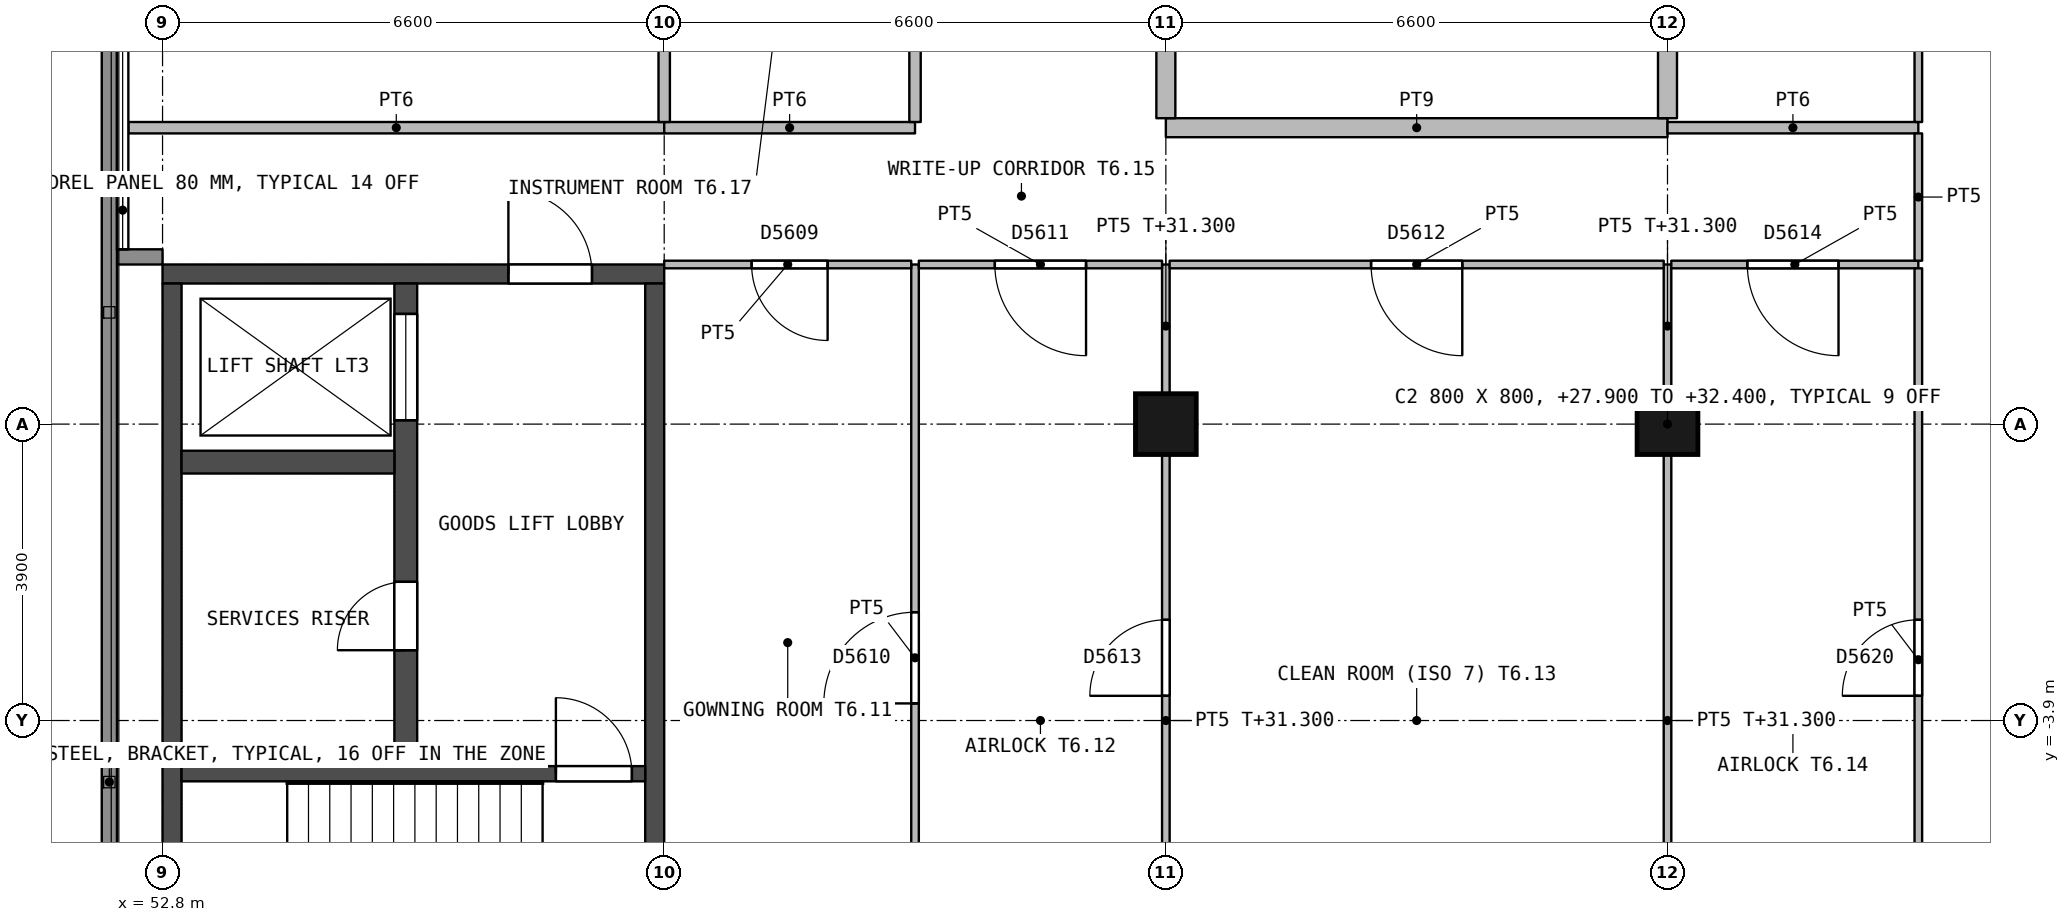
"""IFC4 building model, lengths in metres.
Left out: names, types, materials, properties, quantities, classifications, styles, units other than length and angle.
Written with IfcOpenShell. Run it as: python <this file> out.ifc"""

import sys

from ifc_helpers import new_model, si_unit, direction, frame, frame_2d, origin, origin_2d, place, context, subcontext, project, spatial, rectangle, extrude, element, fill, save


model = new_model("IFC4")
c1 = context("Model", 3, precision=1e-05, world=origin(), true_north=direction((0.0, 1.0)))
c2 = subcontext(c1, "Body", "Model", "MODEL_VIEW")
j1 = project(units=[si_unit("LENGTHUNIT", "METRE"), si_unit("PLANEANGLEUNIT", "RADIAN")], contexts=[c1])
p1 = place(None, origin())
s1 = spatial("IfcSite", under=j1, at=p1, CompositionType="ELEMENT")
p2 = place(p1, origin())
s2 = spatial("IfcBuilding", under=s1, at=p2, CompositionType="ELEMENT")
p3 = place(p2, frame((0.0, 0.0, 27.9)))
s3 = spatial("IfcBuildingStorey", under=s2, at=p3, CompositionType="ELEMENT", Elevation=27.9)
for number, where, z_axis, x_axis in (
    (1, (66.0, 0.0, 0.0), (0.0, 0.0, 1.0), (1.0, 0.0, 0.0)),
    (2, (72.6, 0.0, 0.0), (0.0, 0.0, 1.0), (1.0, 0.0, 0.0)),
):
    element("IfcColumn", number, at=place(p3, frame(where, z_axis=z_axis, x_axis=x_axis)), inside=s3, PredefinedType="COLUMN", context=c2, shape_type="SweptSolid", body=[
        extrude(rectangle(XDim=0.8, YDim=0.8, at=origin_2d()), origin(), (0.0, 0.0, 1.0), 4.5),
    ])
p4 = place(p3, frame((59.4, 1.975, 0.0), z_axis=(0.0, 0.0, 1.0), x_axis=(-1.0, 0.0, 0.0)))
e3 = element("IfcWall", 3, at=p4, inside=s3, PredefinedType="SHEAR", context=c2, shape_type="SweptSolid", body=[
    extrude(rectangle(XDim=6.6, YDim=0.25, at=frame_2d((3.3, 0.0))), origin(), (0.0, 0.0, 1.0), 4.2),
])
p5 = place(p4, frame((0.95, 0.0, 0.0)))
e4 = element("IfcOpeningElement", 4, at=p5, cuts=e3, PredefinedType="OPENING", context=c2, shape_type="SweptSolid", body=[
    extrude(rectangle(XDim=1.1, YDim=2.1, at=frame_2d((0.55, 1.05))), frame((0.0, 0.135, 0.0), z_axis=(0.0, -1.0, 0.0), x_axis=(1.0, 0.0, 0.0)), (0.0, 0.0, 1.0), 0.27),
])
for number, where, z_axis, x_axis in (
    (5, (59.275, 1.85, 0.0), (0.0, 0.0, 1.0), (0.0, -1.0, 0.0)),
    (6, (52.925, 1.85, 0.0), (0.0, 0.0, 1.0), (0.0, -1.0, 0.0)),
):
    element("IfcWall", number, at=place(p3, frame(where, z_axis=z_axis, x_axis=x_axis)), inside=s3, PredefinedType="SHEAR", context=c2, shape_type="SweptSolid", body=[
        extrude(rectangle(XDim=9.4, YDim=0.25, at=frame_2d((4.7, 0.0))), origin(), (0.0, 0.0, 1.0), 4.2),
    ])
p6 = place(p3, frame((59.15, -4.6, 0.0), z_axis=(0.0, 0.0, 1.0), x_axis=(-1.0, 0.0, 0.0)))
e7 = element("IfcWall", 7, at=p6, inside=s3, PredefinedType="SHEAR", context=c2, shape_type="SweptSolid", body=[
    extrude(rectangle(XDim=6.1, YDim=0.2, at=frame_2d((3.05, 0.0))), origin(), (0.0, 0.0, 1.0), 4.2),
])
p7 = place(p6, frame((0.175, 0.0, 0.0)))
e8 = element("IfcOpeningElement", 8, at=p7, cuts=e7, PredefinedType="OPENING", context=c2, shape_type="SweptSolid", body=[
    extrude(rectangle(XDim=1.0, YDim=2.1, at=frame_2d((0.5, 1.05))), frame((0.0, 0.11, 0.0), z_axis=(0.0, -1.0, 0.0), x_axis=(1.0, 0.0, 0.0)), (0.0, 0.0, 1.0), 0.22),
])
p8 = place(p3, frame((56.0, 1.85, 0.0), z_axis=(0.0, 0.0, 1.0), x_axis=(0.0, -1.0, 0.0)))
e9 = element("IfcWall", 9, at=p8, inside=s3, PredefinedType="SHEAR", context=c2, shape_type="SweptSolid", body=[
    extrude(rectangle(XDim=6.35, YDim=0.3, at=frame_2d((3.175, 0.0))), origin(), (0.0, 0.0, 1.0), 4.2),
])
p9 = place(p8, frame((3.925, 0.0, 0.0)))
e10 = element("IfcOpeningElement", 10, at=p9, cuts=e9, PredefinedType="OPENING", context=c2, shape_type="SweptSolid", body=[
    extrude(rectangle(XDim=0.9, YDim=2.1, at=frame_2d((0.45, 1.05))), frame((0.0, 0.16, 0.0), z_axis=(0.0, -1.0, 0.0), x_axis=(1.0, 0.0, 0.0)), (0.0, 0.0, 1.0), 0.32),
])
p10 = place(p8, frame((0.4, 0.0, 0.0)))
e11 = element("IfcOpeningElement", 11, at=p10, cuts=e9, PredefinedType="OPENING", context=c2, shape_type="SweptSolid", body=[
    extrude(rectangle(XDim=1.4, YDim=2.4, at=frame_2d((0.7, 1.2))), frame((0.0, 0.16, 0.0), z_axis=(0.0, -1.0, 0.0), x_axis=(1.0, 0.0, 0.0)), (0.0, 0.0, 1.0), 0.32),
])
p11 = place(p3, frame((55.85, -0.5, 0.0), z_axis=(0.0, 0.0, 1.0), x_axis=(-1.0, 0.0, 0.0)))
e12 = element("IfcWall", 12, at=p11, inside=s3, PredefinedType="SHEAR", context=c2, shape_type="SweptSolid", body=[
    extrude(rectangle(XDim=2.8, YDim=0.3, at=frame_2d((1.4, 0.0))), origin(), (0.0, 0.0, 1.0), 4.2),
])
p12 = place(p3, frame((52.8, 2.2, 0.0), z_axis=(0.0, 0.0, 1.0), x_axis=(-1.0, 0.0, 0.0)))
e13 = element("IfcWall", 13, at=p12, inside=s3, PredefinedType="STANDARD", context=c2, shape_type="SweptSolid", body=[
    extrude(rectangle(XDim=0.6, YDim=0.2, at=frame_2d((0.3, 0.0))), origin(), (0.0, 0.0, 1.0), 3.55),
])
p13 = place(p3, frame((52.1, -7.8, 0.0), z_axis=(0.0, 0.0, 1.0), x_axis=(0.0, 1.0, 0.0)))
e14 = element("IfcWall", 14, at=p13, inside=s3, PredefinedType="PARAPET", context=c2, shape_type="SweptSolid", body=[
    extrude(rectangle(XDim=30.9, YDim=0.2, at=frame_2d((15.45, 0.0))), origin(), (0.0, 0.0, 1.0), 1.1),
])
p14 = place(p3, frame((62.7, 2.1, 0.0), z_axis=(0.0, 0.0, 1.0), x_axis=(0.0, -1.0, 0.0)))
e15 = element("IfcWall", 15, at=p14, inside=s3, PredefinedType="PARTITIONING", context=c2, shape_type="SweptSolid", body=[
    extrude(rectangle(XDim=10.35, YDim=0.1, at=frame_2d((5.175, 0.0))), origin(), (0.0, 0.0, 1.0), 4.2),
])
p15 = place(p14, frame((4.575, 0.0, 0.0)))
e16 = element("IfcOpeningElement", 16, at=p15, cuts=e15, PredefinedType="OPENING", context=c2, shape_type="SweptSolid", body=[
    extrude(rectangle(XDim=1.2, YDim=2.1, at=frame_2d((0.6, 1.05))), frame((0.0, 0.06, 0.0), z_axis=(0.0, -1.0, 0.0), x_axis=(1.0, 0.0, 0.0)), (0.0, 0.0, 1.0), 0.12),
])
p16 = place(p3, frame((62.65, 2.1, 0.0), z_axis=(0.0, 0.0, 1.0), x_axis=(-1.0, 0.0, 0.0)))
e17 = element("IfcWall", 17, at=p16, inside=s3, PredefinedType="PARTITIONING", context=c2, shape_type="SweptSolid", body=[
    extrude(rectangle(XDim=3.25, YDim=0.1, at=frame_2d((1.625, 0.0))), origin(), (0.0, 0.0, 1.0), 4.2),
])
p17 = place(p16, frame((1.1, 0.0, 0.0)))
e18 = element("IfcOpeningElement", 18, at=p17, cuts=e17, PredefinedType="OPENING", context=c2, shape_type="SweptSolid", body=[
    extrude(rectangle(XDim=1.0, YDim=2.1, at=frame_2d((0.5, 1.05))), frame((0.0, 0.06, 0.0), z_axis=(0.0, -1.0, 0.0), x_axis=(1.0, 0.0, 0.0)), (0.0, 0.0, 1.0), 0.12),
])
p18 = place(p3, frame((66.0, -0.4, 0.0), z_axis=(0.0, 0.0, 1.0), x_axis=(0.0, -1.0, 0.0)))
e19 = element("IfcWall", 19, at=p18, inside=s3, PredefinedType="PARTITIONING", context=c2, shape_type="SweptSolid", body=[
    extrude(rectangle(XDim=7.0, YDim=0.1, at=frame_2d((3.5, 0.0))), origin(), (0.0, 0.0, 1.0), 3.4),
])
p19 = place(p18, frame((2.175, 0.0, 0.0)))
e20 = element("IfcOpeningElement", 20, at=p19, cuts=e19, PredefinedType="OPENING", context=c2, shape_type="SweptSolid", body=[
    extrude(rectangle(XDim=1.0, YDim=2.1, at=frame_2d((0.5, 1.05))), frame((0.0, 0.06, 0.0), z_axis=(0.0, -1.0, 0.0), x_axis=(1.0, 0.0, 0.0)), (0.0, 0.0, 1.0), 0.12),
])
p20 = place(p3, frame((66.0, 0.4, 0.0), z_axis=(0.0, 0.0, 1.0), x_axis=(0.0, 1.0, 0.0)))
e21 = element("IfcWall", 21, at=p20, inside=s3, PredefinedType="PARTITIONING", context=c2, shape_type="SweptSolid", body=[
    extrude(rectangle(XDim=1.7, YDim=0.1, at=frame_2d((0.85, 0.0))), origin(), (0.0, 0.0, 1.0), 3.4),
])
p21 = place(p3, frame((65.95, 2.1, 0.0), z_axis=(0.0, 0.0, 1.0), x_axis=(-1.0, 0.0, 0.0)))
e22 = element("IfcWall", 22, at=p21, inside=s3, PredefinedType="PARTITIONING", context=c2, shape_type="SweptSolid", body=[
    extrude(rectangle(XDim=3.2, YDim=0.1, at=frame_2d((1.6, 0.0))), origin(), (0.0, 0.0, 1.0), 4.2),
])
p22 = place(p21, frame((1.0, 0.0, 0.0)))
e23 = element("IfcOpeningElement", 23, at=p22, cuts=e22, PredefinedType="OPENING", context=c2, shape_type="SweptSolid", body=[
    extrude(rectangle(XDim=1.2, YDim=2.1, at=frame_2d((0.6, 1.05))), frame((0.0, 0.06, 0.0), z_axis=(0.0, -1.0, 0.0), x_axis=(1.0, 0.0, 0.0)), (0.0, 0.0, 1.0), 0.12),
])
p23 = place(p3, frame((72.6, -7.4, 0.0), z_axis=(0.0, 0.0, 1.0), x_axis=(0.0, 1.0, 0.0)))
e24 = element("IfcWall", 24, at=p23, inside=s3, PredefinedType="PARTITIONING", context=c2, shape_type="SweptSolid", body=[
    extrude(rectangle(XDim=7.0, YDim=0.1, at=frame_2d((3.5, 0.0))), origin(), (0.0, 0.0, 1.0), 3.4),
])
p24 = place(p3, frame((72.6, 0.4, 0.0), z_axis=(0.0, 0.0, 1.0), x_axis=(0.0, 1.0, 0.0)))
e25 = element("IfcWall", 25, at=p24, inside=s3, PredefinedType="PARTITIONING", context=c2, shape_type="SweptSolid", body=[
    extrude(rectangle(XDim=1.7, YDim=0.1, at=frame_2d((0.85, 0.0))), origin(), (0.0, 0.0, 1.0), 3.4),
])
p25 = place(p3, frame((72.55, 2.1, 0.0), z_axis=(0.0, 0.0, 1.0), x_axis=(-1.0, 0.0, 0.0)))
e26 = element("IfcWall", 26, at=p25, inside=s3, PredefinedType="PARTITIONING", context=c2, shape_type="SweptSolid", body=[
    extrude(rectangle(XDim=6.5, YDim=0.1, at=frame_2d((3.25, 0.0))), origin(), (0.0, 0.0, 1.0), 4.2),
])
p26 = place(p25, frame((2.65, 0.0, 0.0)))
e27 = element("IfcOpeningElement", 27, at=p26, cuts=e26, PredefinedType="OPENING", context=c2, shape_type="SweptSolid", body=[
    extrude(rectangle(XDim=1.2, YDim=2.1, at=frame_2d((0.6, 1.05))), frame((0.0, 0.06, 0.0), z_axis=(0.0, -1.0, 0.0), x_axis=(1.0, 0.0, 0.0)), (0.0, 0.0, 1.0), 0.12),
])
p27 = place(p3, frame((75.9, 2.1, 0.0), z_axis=(0.0, 0.0, 1.0), x_axis=(-1.0, 0.0, 0.0)))
e28 = element("IfcWall", 28, at=p27, inside=s3, PredefinedType="PARTITIONING", context=c2, shape_type="SweptSolid", body=[
    extrude(rectangle(XDim=3.25, YDim=0.1, at=frame_2d((1.625, 0.0))), origin(), (0.0, 0.0, 1.0), 4.2),
])
p28 = place(p27, frame((1.05, 0.0, 0.0)))
e29 = element("IfcOpeningElement", 29, at=p28, cuts=e28, PredefinedType="OPENING", context=c2, shape_type="SweptSolid", body=[
    extrude(rectangle(XDim=1.2, YDim=2.1, at=frame_2d((0.6, 1.05))), frame((0.0, 0.06, 0.0), z_axis=(0.0, -1.0, 0.0), x_axis=(1.0, 0.0, 0.0)), (0.0, 0.0, 1.0), 0.12),
])
p29 = place(p3, frame((75.9, 2.05, 0.0), z_axis=(0.0, 0.0, 1.0), x_axis=(0.0, -1.0, 0.0)))
e30 = element("IfcWall", 30, at=p29, inside=s3, PredefinedType="PARTITIONING", context=c2, shape_type="SweptSolid", body=[
    extrude(rectangle(XDim=10.3, YDim=0.1, at=frame_2d((5.15, 0.0))), origin(), (0.0, 0.0, 1.0), 4.2),
])
p30 = place(p29, frame((4.625, 0.0, 0.0)))
e31 = element("IfcOpeningElement", 31, at=p30, cuts=e30, PredefinedType="OPENING", context=c2, shape_type="SweptSolid", body=[
    extrude(rectangle(XDim=1.0, YDim=2.1, at=frame_2d((0.5, 1.05))), frame((0.0, 0.06, 0.0), z_axis=(0.0, -1.0, 0.0), x_axis=(1.0, 0.0, 0.0)), (0.0, 0.0, 1.0), 0.12),
])
p31 = place(p3, frame((59.4, 3.9, 0.0), z_axis=(0.0, 0.0, 1.0), x_axis=(-1.0, 0.0, 0.0)))
e32 = element("IfcWall", 32, at=p31, inside=s3, PredefinedType="PARTITIONING", context=c2, shape_type="SweptSolid", body=[
    extrude(rectangle(XDim=7.05, YDim=0.15, at=frame_2d((3.525, 0.0))), origin(), (0.0, 0.0, 1.0), 4.2),
])
p32 = place(p3, frame((62.7, 3.9, 0.0), z_axis=(0.0, 0.0, 1.0), x_axis=(-1.0, 0.0, 0.0)))
e33 = element("IfcWall", 33, at=p32, inside=s3, PredefinedType="PARTITIONING", context=c2, shape_type="SweptSolid", body=[
    extrude(rectangle(XDim=3.3, YDim=0.15, at=frame_2d((1.65, 0.0))), origin(), (0.0, 0.0, 1.0), 4.2),
])
p33 = place(p3, frame((72.6, 3.9, 0.0), z_axis=(0.0, 0.0, 1.0), x_axis=(-1.0, 0.0, 0.0)))
e34 = element("IfcWall", 34, at=p33, inside=s3, PredefinedType="PARTITIONING", context=c2, shape_type="SweptSolid", body=[
    extrude(rectangle(XDim=6.6, YDim=0.25, at=frame_2d((3.3, 0.0))), origin(), (0.0, 0.0, 1.0), 4.2),
])
p34 = place(p3, frame((75.9, 3.9, 0.0), z_axis=(0.0, 0.0, 1.0), x_axis=(-1.0, 0.0, 0.0)))
e35 = element("IfcWall", 35, at=p34, inside=s3, PredefinedType="PARTITIONING", context=c2, shape_type="SweptSolid", body=[
    extrude(rectangle(XDim=3.3, YDim=0.15, at=frame_2d((1.65, 0.0))), origin(), (0.0, 0.0, 1.0), 4.2),
])
p35 = place(p3, frame((75.9, 2.15, 0.0), z_axis=(0.0, 0.0, 1.0), x_axis=(0.0, 1.0, 0.0)))
e36 = element("IfcWall", 36, at=p35, inside=s3, PredefinedType="PARTITIONING", context=c2, shape_type="SweptSolid", body=[
    extrude(rectangle(XDim=1.675, YDim=0.1, at=frame_2d((0.837, 0.0))), origin(), (0.0, 0.0, 1.0), 4.2),
])
p36 = place(p3, frame((59.4, 3.975, 0.0), z_axis=(0.0, 0.0, 1.0), x_axis=(0.0, 1.0, 0.0)))
e37 = element("IfcWall", 37, at=p36, inside=s3, PredefinedType="PARTITIONING", context=c2, shape_type="SweptSolid", body=[
    extrude(rectangle(XDim=5.525, YDim=0.15, at=frame_2d((2.762, 0.0))), origin(), (0.0, 0.0, 1.0), 3.4),
])
p37 = place(p3, frame((62.7, 9.825, 0.0), z_axis=(0.0, 0.0, 1.0), x_axis=(0.0, -1.0, 0.0)))
e38 = element("IfcWall", 38, at=p37, inside=s3, PredefinedType="PARTITIONING", context=c2, shape_type="SweptSolid", body=[
    extrude(rectangle(XDim=5.85, YDim=0.15, at=frame_2d((2.925, 0.0))), origin(), (0.0, 0.0, 1.0), 4.2),
])
p38 = place(p37, frame((2.425, 0.0, 0.0)))
e39 = element("IfcOpeningElement", 39, at=p38, cuts=e38, PredefinedType="OPENING", context=c2, shape_type="SweptSolid", body=[
    extrude(rectangle(XDim=1.0, YDim=2.1, at=frame_2d((0.5, 1.05))), frame((0.0, 0.085, 0.0), z_axis=(0.0, -1.0, 0.0), x_axis=(1.0, 0.0, 0.0)), (0.0, 0.0, 1.0), 0.17),
])
for number, where, z_axis, x_axis in (
    (40, (66.0, 4.025, 0.0), (0.0, 0.0, 1.0), (0.0, 1.0, 0.0)),
    (41, (72.6, 4.025, 0.0), (0.0, 0.0, 1.0), (0.0, 1.0, 0.0)),
):
    element("IfcWall", number, at=place(p3, frame(where, z_axis=z_axis, x_axis=x_axis)), inside=s3, PredefinedType="PARTITIONING", context=c2, shape_type="SweptSolid", body=[
        extrude(rectangle(XDim=5.475, YDim=0.25, at=frame_2d((2.738, 0.0))), origin(), (0.0, 0.0, 1.0), 3.4),
    ])
p39 = place(p3, frame((75.9, 3.975, 0.0), z_axis=(0.0, 0.0, 1.0), x_axis=(0.0, 1.0, 0.0)))
e42 = element("IfcWall", 42, at=p39, inside=s3, PredefinedType="PARTITIONING", context=c2, shape_type="SweptSolid", body=[
    extrude(rectangle(XDim=5.85, YDim=0.1, at=frame_2d((2.925, 0.0))), origin(), (0.0, 0.0, 1.0), 4.2),
])
p40 = place(p9, origin())
e43 = element("IfcDoor", 43, at=p40, inside=s3, OperationType="SINGLE_SWING_RIGHT", PredefinedType="DOOR", context=c2, shape_type="SweptSolid", body=[
    extrude(rectangle(XDim=0.9, YDim=2.1, at=frame_2d((0.45, 1.05))), frame((0.0, 0.025, 0.0), z_axis=(0.0, -1.0, 0.0), x_axis=(1.0, 0.0, 0.0)), (0.0, 0.0, 1.0), 0.05),
])
fill(e10, e43)
p41 = place(p5, origin())
e44 = element("IfcDoor", 44, at=p41, inside=s3, OperationType="SINGLE_SWING_RIGHT", PredefinedType="DOOR", context=c2, shape_type="SweptSolid", body=[
    extrude(rectangle(XDim=1.1, YDim=2.1, at=frame_2d((0.55, 1.05))), frame((0.0, 0.025, 0.0), z_axis=(0.0, -1.0, 0.0), x_axis=(1.0, 0.0, 0.0)), (0.0, 0.0, 1.0), 0.05),
])
fill(e4, e44)
p42 = place(p7, origin())
e45 = element("IfcDoor", 45, at=p42, inside=s3, OperationType="SINGLE_SWING_RIGHT", PredefinedType="DOOR", context=c2, shape_type="SweptSolid", body=[
    extrude(rectangle(XDim=1.0, YDim=2.1, at=frame_2d((0.5, 1.05))), frame((0.0, 0.025, 0.0), z_axis=(0.0, -1.0, 0.0), x_axis=(1.0, 0.0, 0.0)), (0.0, 0.0, 1.0), 0.05),
])
fill(e8, e45)
p43 = place(p10, origin())
e46 = element("IfcDoor", 46, at=p43, inside=s3, OperationType="DOUBLE_DOOR_SLIDING", PredefinedType="NOTDEFINED", context=c2, shape_type="SweptSolid", body=[
    extrude(rectangle(XDim=1.4, YDim=2.4, at=frame_2d((0.7, 1.2))), frame((0.0, 0.025, 0.0), z_axis=(0.0, -1.0, 0.0), x_axis=(1.0, 0.0, 0.0)), (0.0, 0.0, 1.0), 0.05),
])
fill(e11, e46)
p44 = place(p17, origin())
e47 = element("IfcDoor", 47, at=p44, inside=s3, OperationType="SINGLE_SWING_LEFT", PredefinedType="DOOR", context=c2, shape_type="SweptSolid", body=[
    extrude(rectangle(XDim=1.0, YDim=2.1, at=frame_2d((0.5, 1.05))), frame((0.0, 0.027, 0.0), z_axis=(0.0, -1.0, 0.0), x_axis=(1.0, 0.0, 0.0)), (0.0, 0.0, 1.0), 0.054),
])
fill(e18, e47)
p45 = place(p15, origin())
e48 = element("IfcDoor", 48, at=p45, inside=s3, OperationType="SINGLE_SWING_RIGHT", PredefinedType="DOOR", context=c2, shape_type="SweptSolid", body=[
    extrude(rectangle(XDim=1.2, YDim=2.1, at=frame_2d((0.6, 1.05))), frame((0.0, 0.027, 0.0), z_axis=(0.0, -1.0, 0.0), x_axis=(1.0, 0.0, 0.0)), (0.0, 0.0, 1.0), 0.054),
])
fill(e16, e48)
p46 = place(p22, origin())
e49 = element("IfcDoor", 49, at=p46, inside=s3, OperationType="SINGLE_SWING_LEFT", PredefinedType="DOOR", context=c2, shape_type="SweptSolid", body=[
    extrude(rectangle(XDim=1.2, YDim=2.1, at=frame_2d((0.6, 1.05))), frame((0.0, 0.027, 0.0), z_axis=(0.0, -1.0, 0.0), x_axis=(1.0, 0.0, 0.0)), (0.0, 0.0, 1.0), 0.054),
])
fill(e23, e49)
p47 = place(p26, origin())
e50 = element("IfcDoor", 50, at=p47, inside=s3, OperationType="SINGLE_SWING_LEFT", PredefinedType="DOOR", context=c2, shape_type="SweptSolid", body=[
    extrude(rectangle(XDim=1.2, YDim=2.1, at=frame_2d((0.6, 1.05))), frame((0.0, 0.03, 0.0), z_axis=(0.0, -1.0, 0.0), x_axis=(1.0, 0.0, 0.0)), (0.0, 0.0, 1.0), 0.06),
])
fill(e27, e50)
p48 = place(p19, origin())
e51 = element("IfcDoor", 51, at=p48, inside=s3, OperationType="SINGLE_SWING_RIGHT", PredefinedType="DOOR", context=c2, shape_type="SweptSolid", body=[
    extrude(rectangle(XDim=1.0, YDim=2.1, at=frame_2d((0.5, 1.05))), frame((0.0, 0.027, 0.0), z_axis=(0.0, -1.0, 0.0), x_axis=(1.0, 0.0, 0.0)), (0.0, 0.0, 1.0), 0.054),
])
fill(e20, e51)
p49 = place(p28, origin())
e52 = element("IfcDoor", 52, at=p49, inside=s3, OperationType="SINGLE_SWING_LEFT", PredefinedType="DOOR", context=c2, shape_type="SweptSolid", body=[
    extrude(rectangle(XDim=1.2, YDim=2.1, at=frame_2d((0.6, 1.05))), frame((0.0, 0.027, 0.0), z_axis=(0.0, -1.0, 0.0), x_axis=(1.0, 0.0, 0.0)), (0.0, 0.0, 1.0), 0.054),
])
fill(e29, e52)
p50 = place(p30, origin())
e53 = element("IfcDoor", 53, at=p50, inside=s3, OperationType="SINGLE_SWING_RIGHT", PredefinedType="DOOR", context=c2, shape_type="SweptSolid", body=[
    extrude(rectangle(XDim=1.0, YDim=2.1, at=frame_2d((0.5, 1.05))), frame((0.0, 0.027, 0.0), z_axis=(0.0, -1.0, 0.0), x_axis=(1.0, 0.0, 0.0)), (0.0, 0.0, 1.0), 0.054),
])
fill(e31, e53)
save(model, sys.argv[1])
